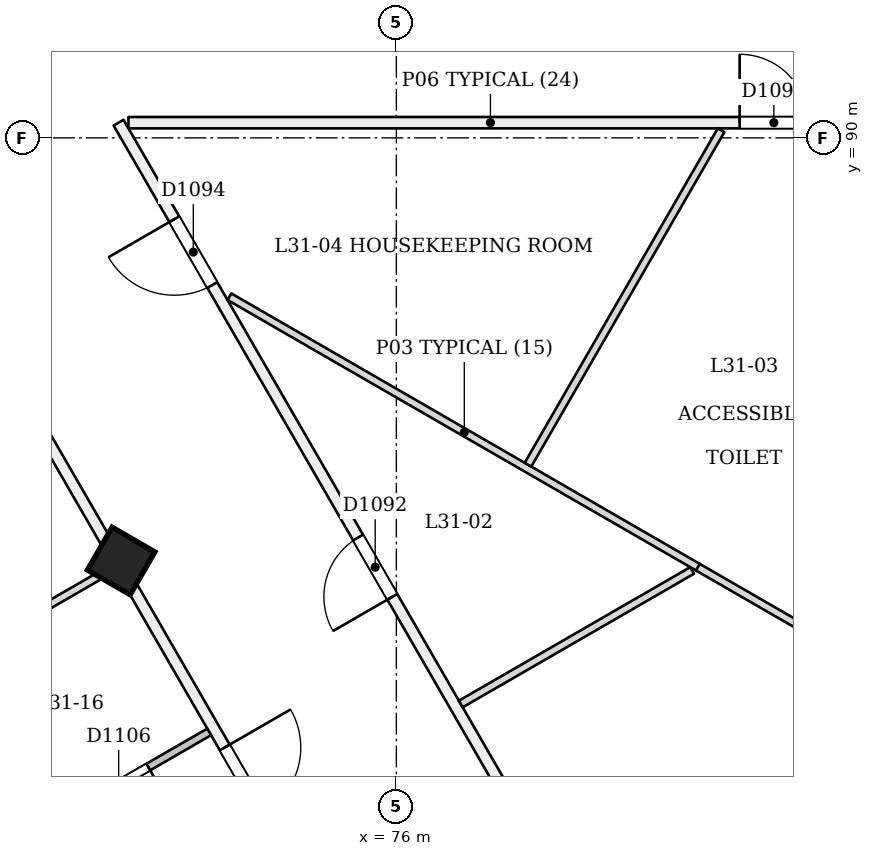
"""IFC4 building model, lengths in metres.
Left out: names, types, materials, properties, quantities, classifications, styles, units other than length and angle.
Written with IfcOpenShell. Run it as: python <this file> out.ifc"""

import sys

from ifc_helpers import new_model, si_unit, direction, frame, frame_2d, origin, origin_2d, place, context, subcontext, project, spatial, rectangle, extrude, element, fill, save


model = new_model("IFC4")
c1 = context("Model", 3, precision=1e-05, world=origin(), true_north=direction((0.0, 1.0)))
c2 = subcontext(c1, "Body", "Model", "MODEL_VIEW")
j1 = project(units=[si_unit("LENGTHUNIT", "METRE"), si_unit("PLANEANGLEUNIT", "RADIAN")], contexts=[c1])
p1 = place(None, origin())
s1 = spatial("IfcSite", under=j1, at=p1, CompositionType="ELEMENT")
p2 = place(p1, origin())
s2 = spatial("IfcBuilding", under=s1, at=p2, CompositionType="ELEMENT")
p3 = place(p2, frame((0.0, 0.0, 124.2)))
s3 = spatial("IfcBuildingStorey", under=s2, at=p3, CompositionType="ELEMENT", Elevation=124.2)
p4 = place(p3, frame((72.352, 84.387, -0.02), z_axis=(0.022221406801, 0.038413224561, 0.999014831351), x_axis=(-0.866025617206, -0.498520426688, 0.038431946587)))
e1 = element("IfcColumn", 1, at=p4, inside=s3, PredefinedType="COLUMN", context=c2, shape_type="SweptSolid", body=[
    extrude(rectangle(XDim=0.65, YDim=0.65, at=origin_2d()), origin(), (0.0, 0.0, 1.0), 3.604),
])
p5 = place(p3, frame((72.475, 90.2, 0.0), z_axis=(0.0, 0.0, 1.0), x_axis=(1.0, 0.0, 0.0)))
e2 = element("IfcWall", 2, at=p5, inside=s3, PredefinedType="PARTITIONING", context=c2, shape_type="SweptSolid", body=[
    extrude(rectangle(XDim=9.525, YDim=0.15, at=frame_2d((4.762, 0.0))), origin(), (0.0, 0.0, 1.0), 3.15),
])
p6 = place(p5, frame((8.041, 0.0, 0.0)))
e3 = element("IfcOpeningElement", 3, at=p6, cuts=e2, PredefinedType="OPENING", context=c2, shape_type="SweptSolid", body=[
    extrude(rectangle(XDim=0.9, YDim=2.1, at=frame_2d((0.45, 1.05))), frame((0.0, 0.085, 0.0), z_axis=(0.0, -1.0, 0.0), x_axis=(1.0, 0.0, 0.0)), (0.0, 0.0, 1.0), 0.171),
])
p7 = place(p3, frame((85.0, 68.281, 0.0), z_axis=(0.0, 0.0, 1.0), x_axis=(-0.49999744999, 0.866026876029, 0.0)))
e4 = element("IfcWall", 4, at=p7, inside=s3, PredefinedType="PARTITIONING", context=c2, shape_type="SweptSolid", body=[
    extrude(rectangle(XDim=25.309, YDim=0.15, at=frame_2d((12.655, 0.0))), origin(), (0.0, 0.0, 1.0), 3.15),
])
p8 = place(p7, frame((18.107, 0.0, 0.0)))
e5 = element("IfcOpeningElement", 5, at=p8, cuts=e4, PredefinedType="OPENING", context=c2, shape_type="SweptSolid", body=[
    extrude(rectangle(XDim=0.9, YDim=2.1, at=frame_2d((0.45, 1.05))), frame((0.0, 0.085, 0.0), z_axis=(0.0, -1.0, 0.0), x_axis=(1.0, 0.0, 0.0)), (0.0, 0.0, 1.0), 0.171),
])
p9 = place(p7, frame((22.843, 0.0, 0.0)))
e6 = element("IfcOpeningElement", 6, at=p9, cuts=e4, PredefinedType="OPENING", context=c2, shape_type="SweptSolid", body=[
    extrude(rectangle(XDim=1.0, YDim=2.1, at=frame_2d((0.5, 1.05))), frame((0.0, 0.085, 0.0), z_axis=(0.0, -1.0, 0.0), x_axis=(1.0, 0.0, 0.0)), (0.0, 0.0, 1.0), 0.171),
])
p10 = place(p7, frame((3.844, 0.0, 0.0)))
e7 = element("IfcOpeningElement", 7, at=p10, cuts=e4, PredefinedType="OPENING", context=c2, shape_type="SweptSolid", body=[
    extrude(rectangle(XDim=1.0, YDim=2.1, at=frame_2d((0.5, 1.05))), frame((0.0, 0.085, 0.0), z_axis=(0.0, -1.0, 0.0), x_axis=(1.0, 0.0, 0.0)), (0.0, 0.0, 1.0), 0.171),
])
p11 = place(p7, frame((13.184, 0.0, 0.0)))
e8 = element("IfcOpeningElement", 8, at=p11, cuts=e4, PredefinedType="OPENING", context=c2, shape_type="SweptSolid", body=[
    extrude(rectangle(XDim=1.0, YDim=2.1, at=frame_2d((0.5, 1.05))), frame((0.0, 0.085, 0.0), z_axis=(0.0, -1.0, 0.0), x_axis=(1.0, 0.0, 0.0)), (0.0, 0.0, 1.0), 0.171),
])
p12 = place(p3, frame((64.413, 98.139, 0.0), z_axis=(0.0, 0.0, 1.0), x_axis=(0.500003831119, -0.866023191876, 0.0)))
e9 = element("IfcWall", 9, at=p12, inside=s3, PredefinedType="PARTITIONING", context=c2, shape_type="SweptSolid", body=[
    extrude(rectangle(XDim=40.758, YDim=0.15, at=frame_2d((20.379, 0.0))), origin(), (0.0, 0.0, 1.0), 2.75),
])
p13 = place(p12, frame((0.2, 0.0, 0.0)))
e10 = element("IfcOpeningElement", 10, at=p13, cuts=e9, PredefinedType="OPENING", context=c2, shape_type="SweptSolid", body=[
    extrude(rectangle(XDim=1.2, YDim=2.1, at=frame_2d((0.6, 1.05))), frame((0.0, 0.085, 0.0), z_axis=(0.0, -1.0, 0.0), x_axis=(1.0, 0.0, 0.0)), (0.0, 0.0, 1.0), 0.171),
])
p14 = place(p12, frame((3.099, 0.0, 0.0)))
e11 = element("IfcOpeningElement", 11, at=p14, cuts=e9, PredefinedType="OPENING", context=c2, shape_type="SweptSolid", body=[
    extrude(rectangle(XDim=1.0, YDim=2.1, at=frame_2d((0.5, 1.05))), frame((0.0, 0.085, 0.0), z_axis=(0.0, -1.0, 0.0), x_axis=(1.0, 0.0, 0.0)), (0.0, 0.0, 1.0), 0.171),
])
p15 = place(p12, frame((9.774, 0.0, 0.0)))
e12 = element("IfcOpeningElement", 12, at=p15, cuts=e9, PredefinedType="OPENING", context=c2, shape_type="SweptSolid", body=[
    extrude(rectangle(XDim=1.0, YDim=2.1, at=frame_2d((0.5, 1.05))), frame((0.0, 0.085, 0.0), z_axis=(0.0, -1.0, 0.0), x_axis=(1.0, 0.0, 0.0)), (0.0, 0.0, 1.0), 0.171),
])
p16 = place(p12, frame((11.984, 0.0, 0.0)))
e13 = element("IfcOpeningElement", 13, at=p16, cuts=e9, PredefinedType="OPENING", context=c2, shape_type="SweptSolid", body=[
    extrude(rectangle(XDim=1.0, YDim=2.1, at=frame_2d((0.5, 1.05))), frame((0.0, 0.085, 0.0), z_axis=(0.0, -1.0, 0.0), x_axis=(1.0, 0.0, 0.0)), (0.0, 0.0, 1.0), 0.171),
])
p17 = place(p12, frame((18.659, 0.0, 0.0)))
e14 = element("IfcOpeningElement", 14, at=p17, cuts=e9, PredefinedType="OPENING", context=c2, shape_type="SweptSolid", body=[
    extrude(rectangle(XDim=1.0, YDim=2.1, at=frame_2d((0.5, 1.05))), frame((0.0, 0.085, 0.0), z_axis=(0.0, -1.0, 0.0), x_axis=(1.0, 0.0, 0.0)), (0.0, 0.0, 1.0), 0.171),
])
p18 = place(p12, frame((22.129, 0.0, 0.0)))
e15 = element("IfcOpeningElement", 15, at=p18, cuts=e9, PredefinedType="OPENING", context=c2, shape_type="SweptSolid", body=[
    extrude(rectangle(XDim=1.0, YDim=2.1, at=frame_2d((0.5, 1.05))), frame((0.0, 0.085, 0.0), z_axis=(0.0, -1.0, 0.0), x_axis=(1.0, 0.0, 0.0)), (0.0, 0.0, 1.0), 0.171),
])
p19 = place(p12, frame((27.659, 0.0, 0.0)))
e16 = element("IfcOpeningElement", 16, at=p19, cuts=e9, PredefinedType="OPENING", context=c2, shape_type="SweptSolid", body=[
    extrude(rectangle(XDim=1.0, YDim=2.1, at=frame_2d((0.5, 1.05))), frame((0.0, 0.085, 0.0), z_axis=(0.0, -1.0, 0.0), x_axis=(1.0, 0.0, 0.0)), (0.0, 0.0, 1.0), 0.171),
])
p20 = place(p12, frame((31.129, 0.0, 0.0)))
e17 = element("IfcOpeningElement", 17, at=p20, cuts=e9, PredefinedType="OPENING", context=c2, shape_type="SweptSolid", body=[
    extrude(rectangle(XDim=1.0, YDim=2.1, at=frame_2d((0.5, 1.05))), frame((0.0, 0.085, 0.0), z_axis=(0.0, -1.0, 0.0), x_axis=(1.0, 0.0, 0.0)), (0.0, 0.0, 1.0), 0.171),
])
p21 = place(p12, frame((36.659, 0.0, 0.0)))
e18 = element("IfcOpeningElement", 18, at=p21, cuts=e9, PredefinedType="OPENING", context=c2, shape_type="SweptSolid", body=[
    extrude(rectangle(XDim=1.0, YDim=2.1, at=frame_2d((0.5, 1.05))), frame((0.0, 0.085, 0.0), z_axis=(0.0, -1.0, 0.0), x_axis=(1.0, 0.0, 0.0)), (0.0, 0.0, 1.0), 0.171),
])
p22 = place(p12, frame((39.445, 0.0, 0.0)))
e19 = element("IfcOpeningElement", 19, at=p22, cuts=e9, PredefinedType="OPENING", context=c2, shape_type="SweptSolid", body=[
    extrude(rectangle(XDim=1.0, YDim=2.1, at=frame_2d((0.5, 1.05))), frame((0.0, 0.085, 0.0), z_axis=(0.0, -1.0, 0.0), x_axis=(1.0, 0.0, 0.0)), (0.0, 0.0, 1.0), 0.171),
])
p23 = place(p3, frame((79.983, 84.343, 0.0), z_axis=(0.0, 0.0, 1.0), x_axis=(-0.866015220358, 0.500017637798, 0.0)))
e20 = element("IfcWall", 20, at=p23, inside=s3, PredefinedType="PARTITIONING", context=c2, shape_type="SweptSolid", body=[
    extrude(rectangle(XDim=7.135, YDim=0.1, at=frame_2d((3.568, 0.0))), origin(), (0.0, 0.0, 1.0), 3.15),
])
p24 = place(p3, frame((76.847, 82.552, 0.0), z_axis=(0.0, 0.0, 1.0), x_axis=(0.866020164116, 0.500009075263, 0.0)))
e21 = element("IfcWall", 21, at=p24, inside=s3, PredefinedType="PARTITIONING", context=c2, shape_type="SweptSolid", body=[
    extrude(rectangle(XDim=3.515, YDim=0.1, at=frame_2d((1.757, 0.0))), origin(), (0.0, 0.0, 1.0), 3.15),
])
p25 = place(p3, frame((80.272, 90.1, 0.0), z_axis=(0.0, 0.0, 1.0), x_axis=(-0.499984530349, -0.866034335007, 0.0)))
e22 = element("IfcWall", 22, at=p25, inside=s3, PredefinedType="PARTITIONING", context=c2, shape_type="SweptSolid", body=[
    extrude(rectangle(XDim=5.08, YDim=0.1, at=frame_2d((2.54, 0.0))), origin(), (0.0, 0.0, 1.0), 3.15),
])
p26 = place(p3, frame((79.966, 84.353, 0.0), z_axis=(0.0, 0.0, 1.0), x_axis=(0.866037201768, -0.499979564737, 0.0)))
e23 = element("IfcWall", 23, at=p26, inside=s3, PredefinedType="PARTITIONING", context=c2, shape_type="SweptSolid", body=[
    extrude(rectangle(XDim=3.726, YDim=0.1, at=frame_2d((1.863, 0.0))), origin(), (0.0, 0.0, 1.0), 3.15),
])
p27 = place(p3, frame((80.251, 77.155, 0.0), z_axis=(0.0, 0.0, 1.0), x_axis=(0.500028081597, 0.86600919026, 0.0)))
e24 = element("IfcWall", 24, at=p27, inside=s3, PredefinedType="PARTITIONING", context=c2, shape_type="SweptSolid", body=[
    extrude(rectangle(XDim=6.016, YDim=0.15, at=frame_2d((3.008, 0.0))), origin(), (0.0, 0.0, 1.0), 3.15),
])
p28 = place(p3, frame((69.841, 82.938, 0.0), z_axis=(0.0, 0.0, 1.0), x_axis=(0.866011447264, 0.500024172624, 0.0)))
e25 = element("IfcWall", 25, at=p28, inside=s3, PredefinedType="PARTITIONING", context=c2, shape_type="SweptSolid", body=[
    extrude(rectangle(XDim=2.825, YDim=0.1, at=frame_2d((1.413, 0.0))), origin(), (0.0, 0.0, 1.0), 2.75),
])
p29 = place(p3, frame((73.537, 82.185, 0.0), z_axis=(0.0, 0.0, 1.0), x_axis=(-0.866011447264, -0.500024172624, 0.0)))
e26 = element("IfcWall", 26, at=p29, inside=s3, PredefinedType="PARTITIONING", context=c2, shape_type="SweptSolid", body=[
    extrude(rectangle(XDim=2.825, YDim=0.1, at=frame_2d((1.413, 0.0))), origin(), (0.0, 0.0, 1.0), 3.15),
])
p30 = place(p29, frame((0.925, 0.0, 0.0)))
e27 = element("IfcOpeningElement", 27, at=p30, cuts=e26, PredefinedType="OPENING", context=c2, shape_type="SweptSolid", body=[
    extrude(rectangle(XDim=0.9, YDim=2.1, at=frame_2d((0.45, 1.05))), frame((0.0, 0.061, 0.0), z_axis=(0.0, -1.0, 0.0), x_axis=(1.0, 0.0, 0.0)), (0.0, 0.0, 1.0), 0.121),
])
p31 = place(p8, origin())
e28 = element("IfcDoor", 28, at=p31, inside=s3, OperationType="SINGLE_SWING_LEFT", PredefinedType="NOTDEFINED", context=c2, shape_type="SweptSolid", body=[
    extrude(rectangle(XDim=0.9, YDim=2.1, at=frame_2d((0.45, 1.05))), frame((0.0, 0.025, 0.0), z_axis=(0.0, -1.0, 0.0), x_axis=(1.0, 0.0, 0.0)), (0.0, 0.0, 1.0), 0.05),
])
fill(e5, e28)
p32 = place(p6, origin())
e29 = element("IfcDoor", 29, at=p32, inside=s3, OperationType="SINGLE_SWING_LEFT", PredefinedType="NOTDEFINED", context=c2, shape_type="SweptSolid", body=[
    extrude(rectangle(XDim=0.9, YDim=2.1, at=frame_2d((0.45, 1.05))), frame((0.0, 0.025, 0.0), z_axis=(0.0, -1.0, 0.0), x_axis=(1.0, 0.0, 0.0)), (0.0, 0.0, 1.0), 0.05),
])
fill(e3, e29)
p33 = place(p9, origin())
e30 = element("IfcDoor", 30, at=p33, inside=s3, OperationType="SINGLE_SWING_RIGHT", PredefinedType="NOTDEFINED", context=c2, shape_type="SweptSolid", body=[
    extrude(rectangle(XDim=1.0, YDim=2.1, at=frame_2d((0.5, 1.05))), frame((0.0, 0.025, 0.0), z_axis=(0.0, -1.0, 0.0), x_axis=(1.0, 0.0, 0.0)), (0.0, 0.0, 1.0), 0.05),
])
fill(e6, e30)
p34 = place(p17, origin())
e31 = element("IfcDoor", 31, at=p34, inside=s3, OperationType="SINGLE_SWING_LEFT", PredefinedType="NOTDEFINED", context=c2, shape_type="SweptSolid", body=[
    extrude(rectangle(XDim=1.0, YDim=2.1, at=frame_2d((0.5, 1.05))), frame((0.0, 0.025, 0.0), z_axis=(0.0, -1.0, 0.0), x_axis=(1.0, 0.0, 0.0)), (0.0, 0.0, 1.0), 0.05),
])
fill(e14, e31)
p35 = place(p30, origin())
e32 = element("IfcDoor", 32, at=p35, inside=s3, OperationType="SINGLE_SWING_LEFT", PredefinedType="NOTDEFINED", context=c2, shape_type="SweptSolid", body=[
    extrude(rectangle(XDim=0.9, YDim=2.1, at=frame_2d((0.45, 1.05))), frame((0.0, 0.025, 0.0), z_axis=(0.0, -1.0, 0.0), x_axis=(1.0, 0.0, 0.0)), (0.0, 0.0, 1.0), 0.05),
])
fill(e27, e32)
save(model, sys.argv[1])
